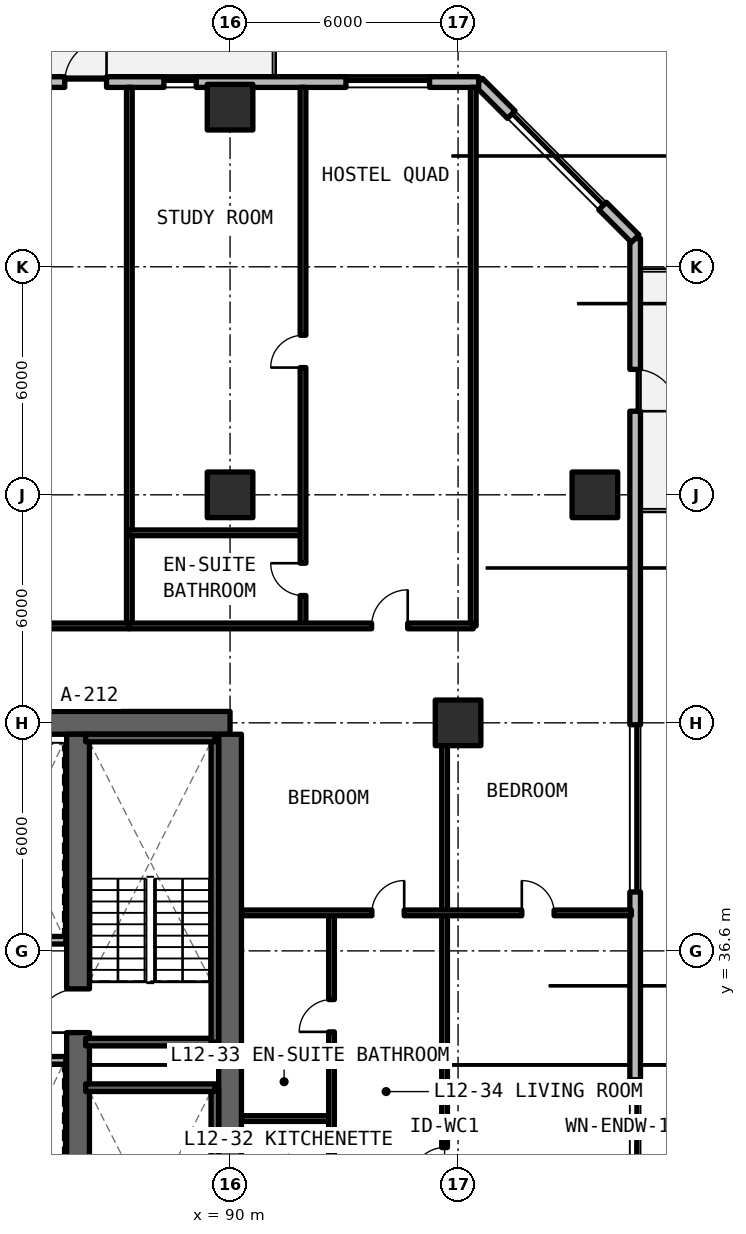
"""IFC4 building model, lengths in metres.
Left out: names, types, materials, properties, quantities, classifications, styles, units other than length and angle.
Written with IfcOpenShell. Run it as: python <this file> out.ifc"""

import sys

from ifc_helpers import new_model, si_unit, direction, frame, frame_2d, origin, origin_2d, place, context, subcontext, project, spatial, rectangle, extrude, element, fill, save


model = new_model("IFC4")
c1 = context("Model", 3, precision=1e-05, world=origin(), true_north=direction((0.0, 1.0)))
c2 = subcontext(c1, "Body", "Model", "MODEL_VIEW")
j1 = project(units=[si_unit("LENGTHUNIT", "METRE"), si_unit("PLANEANGLEUNIT", "RADIAN")], contexts=[c1])
p1 = place(None, origin())
s1 = spatial("IfcSite", under=j1, at=p1, CompositionType="ELEMENT")
p2 = place(p1, origin())
s2 = spatial("IfcBuilding", under=s1, at=p2, CompositionType="ELEMENT")
p3 = place(p2, frame((0.0, 0.0, 45.54)))
s3 = spatial("IfcBuildingStorey", under=s2, at=p3, CompositionType="ELEMENT", Elevation=45.54)
p4 = place(p3, frame((90.0, 42.6, 0.0), z_axis=(0.0, 0.0, 1.0), x_axis=(-1.0, 0.0, 0.0)))
e1 = element("IfcWall", 1, at=p4, inside=s3, PredefinedType="SHEAR", context=c2, shape_type="SweptSolid", body=[
    extrude(rectangle(XDim=12.0, YDim=0.6, at=frame_2d((6.0, 0.0))), origin(), (0.0, 0.0, 1.0), 3.3),
])
p5 = place(p3, frame((90.0, 24.9, 0.0), z_axis=(0.0, 0.0, 1.0), x_axis=(0.0, 1.0, 0.0)))
e2 = element("IfcWall", 2, at=p5, inside=s3, PredefinedType="SHEAR", context=c2, shape_type="SweptSolid", body=[
    extrude(rectangle(XDim=17.4, YDim=0.6, at=frame_2d((8.7, 0.0))), origin(), (0.0, 0.0, 1.0), 3.3),
])
p6 = place(p3, frame((86.0, 24.9, 0.0), z_axis=(0.0, 0.0, 1.0), x_axis=(0.0, 1.0, 0.0)))
e3 = element("IfcWall", 3, at=p6, inside=s3, PredefinedType="SHEAR", context=c2, shape_type="SweptSolid", body=[
    extrude(rectangle(XDim=17.4, YDim=0.6, at=frame_2d((8.7, 0.0))), origin(), (0.0, 0.0, 1.0), 3.3),
])
p7 = place(p6, frame((0.35, 0.0, 0.0)))
e4 = element("IfcOpeningElement", 4, at=p7, cuts=e3, PredefinedType="OPENING", context=c2, shape_type="SweptSolid", body=[
    extrude(rectangle(XDim=1.15, YDim=2.15, at=frame_2d((0.575, 1.075))), frame((0.0, 0.31, 0.0), z_axis=(0.0, -1.0, 0.0), x_axis=(1.0, 0.0, 0.0)), (0.0, 0.0, 1.0), 0.62),
])
p8 = place(p6, frame((9.55, 0.0, 0.0)))
e5 = element("IfcOpeningElement", 5, at=p8, cuts=e3, PredefinedType="OPENING", context=c2, shape_type="SweptSolid", body=[
    extrude(rectangle(XDim=1.15, YDim=2.15, at=frame_2d((0.575, 1.075))), frame((0.0, 0.31, 0.0), z_axis=(0.0, -1.0, 0.0), x_axis=(1.0, 0.0, 0.0)), (0.0, 0.0, 1.0), 0.62),
])
for number, where, z_axis, x_axis in (
    (6, (96.0, 42.6, 0.0), (0.0, 0.0, 1.0), (1.0, 0.0, 0.0)),
    (7, (90.0, 48.6, 0.0), (0.0, 0.0, 1.0), (1.0, 0.0, 0.0)),
    (8, (99.6, 48.6, 0.0), (0.0, 0.0, 1.0), (1.0, 0.0, 0.0)),
    (9, (90.0, 58.8, 0.0), (0.0, 0.0, 1.0), (1.0, 0.0, 0.0)),
):
    element("IfcColumn", number, at=place(p3, frame(where, z_axis=z_axis, x_axis=x_axis)), inside=s3, PredefinedType="COLUMN", context=c2, shape_type="SweptSolid", body=[
        extrude(rectangle(XDim=1.2, YDim=1.2, at=origin_2d()), origin(), (0.0, 0.0, 1.0), 3.3),
    ])
p9 = place(p3, frame((100.66, 11.858, 0.0), z_axis=(0.0, 0.0, 1.0), x_axis=(0.0, 1.0, 0.0)))
e10 = element("IfcWall", 10, at=p9, inside=s3, PredefinedType="SOLIDWALL", context=c2, shape_type="SweptSolid", body=[
    extrude(rectangle(XDim=43.484, YDim=0.28, at=frame_2d((21.742, 0.0))), origin(), (0.0, 0.0, 1.0), 3.08),
])
p10 = place(p9, frame((3.442, 0.0, 0.0)))
e11 = element("IfcOpeningElement", 11, at=p10, cuts=e10, PredefinedType="OPENING", context=c2, shape_type="SweptSolid", body=[
    extrude(rectangle(XDim=1.1, YDim=2.15, at=frame_2d((0.55, 1.075))), frame((0.0, 0.15, 0.0), z_axis=(0.0, -1.0, 0.0), x_axis=(1.0, 0.0, 0.0)), (0.0, 0.0, 1.0), 0.3),
])
p11 = place(p9, frame((38.942, 0.0, 0.0)))
e12 = element("IfcOpeningElement", 12, at=p11, cuts=e10, PredefinedType="OPENING", context=c2, shape_type="SweptSolid", body=[
    extrude(rectangle(XDim=1.1, YDim=2.15, at=frame_2d((0.55, 1.075))), frame((0.0, 0.15, 0.0), z_axis=(0.0, -1.0, 0.0), x_axis=(1.0, 0.0, 0.0)), (0.0, 0.0, 1.0), 0.3),
])
p12 = place(p9, frame((16.952, 0.0, 0.78)))
e13 = element("IfcOpeningElement", 13, at=p12, cuts=e10, PredefinedType="OPENING", context=c2, shape_type="SweptSolid", body=[
    extrude(rectangle(XDim=4.4, YDim=1.66, at=frame_2d((2.2, 0.83))), frame((0.0, 0.15, 0.0), z_axis=(0.0, -1.0, 0.0), x_axis=(1.0, 0.0, 0.0)), (0.0, 0.0, 1.0), 0.3),
])
p13 = place(p9, frame((26.292, 0.0, 0.78)))
e14 = element("IfcOpeningElement", 14, at=p13, cuts=e10, PredefinedType="OPENING", context=c2, shape_type="SweptSolid", body=[
    extrude(rectangle(XDim=4.4, YDim=1.66, at=frame_2d((2.2, 0.83))), frame((0.0, 0.15, 0.0), z_axis=(0.0, -1.0, 0.0), x_axis=(1.0, 0.0, 0.0)), (0.0, 0.0, 1.0), 0.3),
])
p14 = place(p3, frame((100.66, 55.342, 0.0), z_axis=(0.0, 0.0, 1.0), x_axis=(-0.707106781187, 0.707106781187, 0.0)))
e15 = element("IfcWall", 15, at=p14, inside=s3, PredefinedType="SOLIDWALL", context=c2, shape_type="SweptSolid", body=[
    extrude(rectangle(XDim=5.824, YDim=0.28, at=frame_2d((2.912, 0.0))), origin(), (0.0, 0.0, 1.0), 3.08),
])
p15 = place(p14, frame((1.212, 0.0, 0.78)))
e16 = element("IfcOpeningElement", 16, at=p15, cuts=e15, PredefinedType="OPENING", context=c2, shape_type="SweptSolid", body=[
    extrude(rectangle(XDim=3.4, YDim=1.66, at=frame_2d((1.7, 0.83))), frame((0.0, 0.15, 0.0), z_axis=(0.0, -1.0, 0.0), x_axis=(1.0, 0.0, 0.0)), (0.0, 0.0, 1.0), 0.3),
])
p16 = place(p3, frame((96.542, 59.46, 0.0), z_axis=(0.0, 0.0, 1.0), x_axis=(-1.0, 0.0, 0.0)))
e17 = element("IfcWall", 17, at=p16, inside=s3, PredefinedType="SOLIDWALL", context=c2, shape_type="SweptSolid", body=[
    extrude(rectangle(XDim=44.402, YDim=0.28, at=frame_2d((22.201, 0.0))), origin(), (0.0, 0.0, 1.0), 3.08),
])
p17 = place(p16, frame((32.592, 0.0, 0.0)))
e18 = element("IfcOpeningElement", 18, at=p17, cuts=e17, PredefinedType="OPENING", context=c2, shape_type="SweptSolid", body=[
    extrude(rectangle(XDim=1.1, YDim=2.15, at=frame_2d((0.55, 1.075))), frame((0.0, 0.15, 0.0), z_axis=(0.0, -1.0, 0.0), x_axis=(1.0, 0.0, 0.0)), (0.0, 0.0, 1.0), 0.3),
])
p18 = place(p16, frame((21.742, 0.0, 0.0)))
e19 = element("IfcOpeningElement", 19, at=p18, cuts=e17, PredefinedType="OPENING", context=c2, shape_type="SweptSolid", body=[
    extrude(rectangle(XDim=1.1, YDim=2.15, at=frame_2d((0.55, 1.075))), frame((0.0, 0.15, 0.0), z_axis=(0.0, -1.0, 0.0), x_axis=(1.0, 0.0, 0.0)), (0.0, 0.0, 1.0), 0.3),
])
p19 = place(p16, frame((9.792, 0.0, 0.0)))
e20 = element("IfcOpeningElement", 20, at=p19, cuts=e17, PredefinedType="OPENING", context=c2, shape_type="SweptSolid", body=[
    extrude(rectangle(XDim=1.1, YDim=2.15, at=frame_2d((0.55, 1.075))), frame((0.0, 0.15, 0.0), z_axis=(0.0, -1.0, 0.0), x_axis=(1.0, 0.0, 0.0)), (0.0, 0.0, 1.0), 0.3),
])
p20 = place(p16, frame((39.455, 0.0, 0.78)))
e21 = element("IfcOpeningElement", 21, at=p20, cuts=e17, PredefinedType="OPENING", context=c2, shape_type="SweptSolid", body=[
    extrude(rectangle(XDim=2.2, YDim=1.66, at=frame_2d((1.1, 0.83))), frame((0.0, 0.15, 0.0), z_axis=(0.0, -1.0, 0.0), x_axis=(1.0, 0.0, 0.0)), (0.0, 0.0, 1.0), 0.3),
])
p21 = place(p16, frame((7.432, 0.0, 0.78)))
e22 = element("IfcOpeningElement", 22, at=p21, cuts=e17, PredefinedType="OPENING", context=c2, shape_type="SweptSolid", body=[
    extrude(rectangle(XDim=0.85, YDim=1.65, at=frame_2d((0.425, 0.825))), frame((0.0, 0.15, 0.0), z_axis=(0.0, -1.0, 0.0), x_axis=(1.0, 0.0, 0.0)), (0.0, 0.0, 1.0), 0.3),
])
p22 = place(p16, frame((1.292, 0.0, 0.78)))
e23 = element("IfcOpeningElement", 23, at=p22, cuts=e17, PredefinedType="OPENING", context=c2, shape_type="SweptSolid", body=[
    extrude(rectangle(XDim=2.2, YDim=1.66, at=frame_2d((1.1, 0.83))), frame((0.0, 0.15, 0.0), z_axis=(0.0, -1.0, 0.0), x_axis=(1.0, 0.0, 0.0)), (0.0, 0.0, 1.0), 0.3),
])
for number, where, z_axis, x_axis in (
    (24, (83.2, 33.72, 0.0), (0.0, 0.0, 1.0), (1.0, 0.0, 0.0)),
    (25, (83.2, 36.88, 0.0), (0.0, 0.0, 1.0), (1.0, 0.0, 0.0)),
):
    element("IfcWall", number, at=place(p3, frame(where, z_axis=z_axis, x_axis=x_axis)), inside=s3, PredefinedType="SOLIDWALL", context=c2, shape_type="SweptSolid", body=[
        extrude(rectangle(XDim=2.48, YDim=0.2, at=frame_2d((1.24, 0.0))), origin(), (0.0, 0.0, 1.0), 2.35),
    ])
p23 = place(p3, frame((95.645, 24.4, 0.0), z_axis=(0.0, 0.0, 1.0), x_axis=(0.0, 1.0, 0.0)))
e26 = element("IfcWall", 26, at=p23, inside=s3, PredefinedType="PARTITIONING", context=c2, shape_type="SweptSolid", body=[
    extrude(rectangle(XDim=13.2, YDim=0.15, at=frame_2d((6.6, 0.0))), origin(), (0.0, 0.0, 1.0), 2.35),
])
p24 = place(p23, frame((6.175, 0.0, 0.0)))
e27 = element("IfcOpeningElement", 27, at=p24, cuts=e26, PredefinedType="OPENING", context=c2, shape_type="SweptSolid", body=[
    extrude(rectangle(XDim=0.85, YDim=2.1, at=frame_2d((0.425, 1.05))), frame((0.0, 0.085, 0.0), z_axis=(0.0, -1.0, 0.0), x_axis=(1.0, 0.0, 0.0)), (0.0, 0.0, 1.0), 0.17),
])
p25 = place(p3, frame((90.32, 32.188, 0.0), z_axis=(0.0, 0.0, 1.0), x_axis=(1.0, 0.0, 0.0)))
e28 = element("IfcWall", 28, at=p25, inside=s3, PredefinedType="PARTITIONING", context=c2, shape_type="SweptSolid", body=[
    extrude(rectangle(XDim=2.35, YDim=0.15, at=frame_2d((1.175, 0.0))), origin(), (0.0, 0.0, 1.0), 2.35),
])
p26 = place(p3, frame((92.67, 24.4, 0.0), z_axis=(0.0, 0.0, 1.0), x_axis=(0.0, 1.0, 0.0)))
e29 = element("IfcWall", 29, at=p26, inside=s3, PredefinedType="PARTITIONING", context=c2, shape_type="SweptSolid", body=[
    extrude(rectangle(XDim=13.2, YDim=0.15, at=frame_2d((6.6, 0.0))), origin(), (0.0, 0.0, 1.0), 2.35),
])
p27 = place(p26, frame((3.469, 0.0, 0.0)))
e30 = element("IfcOpeningElement", 30, at=p27, cuts=e29, PredefinedType="OPENING", context=c2, shape_type="SweptSolid", body=[
    extrude(rectangle(XDim=0.85, YDim=2.1, at=frame_2d((0.425, 1.05))), frame((0.0, 0.085, 0.0), z_axis=(0.0, -1.0, 0.0), x_axis=(1.0, 0.0, 0.0)), (0.0, 0.0, 1.0), 0.17),
])
p28 = place(p26, frame((10.069, 0.0, 0.0)))
e31 = element("IfcOpeningElement", 31, at=p28, cuts=e29, PredefinedType="OPENING", context=c2, shape_type="SweptSolid", body=[
    extrude(rectangle(XDim=0.85, YDim=2.1, at=frame_2d((0.425, 1.05))), frame((0.0, 0.085, 0.0), z_axis=(0.0, -1.0, 0.0), x_axis=(1.0, 0.0, 0.0)), (0.0, 0.0, 1.0), 0.17),
])
p29 = place(p3, frame((95.645, 37.6, 0.0), z_axis=(0.0, 0.0, 1.0), x_axis=(0.0, 1.0, 0.0)))
e32 = element("IfcWall", 32, at=p29, inside=s3, PredefinedType="PARTITIONING", context=c2, shape_type="SweptSolid", body=[
    extrude(rectangle(XDim=5.2, YDim=0.15, at=frame_2d((2.6, 0.0))), origin(), (0.0, 0.0, 1.0), 2.35),
])
p30 = place(p3, frame((90.32, 37.6, 0.0), z_axis=(0.0, 0.0, 1.0), x_axis=(1.0, 0.0, 0.0)))
e33 = element("IfcWall", 33, at=p30, inside=s3, PredefinedType="PARTITIONING", context=c2, shape_type="SweptSolid", body=[
    extrude(rectangle(XDim=10.24, YDim=0.15, at=frame_2d((5.12, 0.0))), origin(), (0.0, 0.0, 1.0), 2.35),
])
p31 = place(p30, frame((3.412, 0.0, 0.0)))
e34 = element("IfcOpeningElement", 34, at=p31, cuts=e33, PredefinedType="OPENING", context=c2, shape_type="SweptSolid", body=[
    extrude(rectangle(XDim=0.85, YDim=2.1, at=frame_2d((0.425, 1.05))), frame((0.0, 0.085, 0.0), z_axis=(0.0, -1.0, 0.0), x_axis=(1.0, 0.0, 0.0)), (0.0, 0.0, 1.0), 0.17),
])
p32 = place(p30, frame((7.357, 0.0, 0.0)))
e35 = element("IfcOpeningElement", 35, at=p32, cuts=e33, PredefinedType="OPENING", context=c2, shape_type="SweptSolid", body=[
    extrude(rectangle(XDim=0.85, YDim=2.1, at=frame_2d((0.425, 1.05))), frame((0.0, 0.085, 0.0), z_axis=(0.0, -1.0, 0.0), x_axis=(1.0, 0.0, 0.0)), (0.0, 0.0, 1.0), 0.17),
])
for number, where, z_axis, x_axis in (
    (36, (96.4, 45.15, 0.0), (0.0, 0.0, 1.0), (0.0, 1.0, 0.0)),
    (37, (87.35, 45.15, 0.0), (0.0, 0.0, 1.0), (0.0, 1.0, 0.0)),
):
    element("IfcWall", number, at=place(p3, frame(where, z_axis=z_axis, x_axis=x_axis)), inside=s3, PredefinedType="SOLIDWALL", context=c2, shape_type="SweptSolid", body=[
        extrude(rectangle(XDim=14.17, YDim=0.15, at=frame_2d((7.085, 0.0))), origin(), (0.0, 0.0, 1.0), 2.35),
    ])
p33 = place(p3, frame((75.391, 45.15, 0.0), z_axis=(0.0, 0.0, 1.0), x_axis=(1.0, 0.0, 0.0)))
e38 = element("IfcWall", 38, at=p33, inside=s3, PredefinedType="SOLIDWALL", context=c2, shape_type="SweptSolid", body=[
    extrude(rectangle(XDim=11.959, YDim=0.15, at=frame_2d((5.979, 0.0))), origin(), (0.0, 0.0, 1.0), 2.35),
])
p34 = place(p33, frame((5.429, 0.0, 0.0)))
e39 = element("IfcOpeningElement", 39, at=p34, cuts=e38, PredefinedType="OPENING", context=c2, shape_type="SweptSolid", body=[
    extrude(rectangle(XDim=1.1, YDim=2.15, at=frame_2d((0.55, 1.075))), frame((0.0, 0.085, 0.0), z_axis=(0.0, -1.0, 0.0), x_axis=(1.0, 0.0, 0.0)), (0.0, 0.0, 1.0), 0.17),
])
p35 = place(p3, frame((87.35, 47.6, 0.0), z_axis=(0.0, 0.0, 1.0), x_axis=(1.0, 0.0, 0.0)))
e40 = element("IfcWall", 40, at=p35, inside=s3, PredefinedType="PARTITIONING", context=c2, shape_type="SweptSolid", body=[
    extrude(rectangle(XDim=4.57, YDim=0.15, at=frame_2d((2.285, 0.0))), origin(), (0.0, 0.0, 1.0), 2.35),
])
p36 = place(p3, frame((91.92, 45.15, 0.0), z_axis=(0.0, 0.0, 1.0), x_axis=(0.0, 1.0, 0.0)))
e41 = element("IfcWall", 41, at=p36, inside=s3, PredefinedType="PARTITIONING", context=c2, shape_type="SweptSolid", body=[
    extrude(rectangle(XDim=14.17, YDim=0.15, at=frame_2d((7.085, 0.0))), origin(), (0.0, 0.0, 1.0), 2.35),
])
p37 = place(p36, frame((0.8, 0.0, 0.0)))
e42 = element("IfcOpeningElement", 42, at=p37, cuts=e41, PredefinedType="OPENING", context=c2, shape_type="SweptSolid", body=[
    extrude(rectangle(XDim=0.85, YDim=2.1, at=frame_2d((0.425, 1.05))), frame((0.0, 0.085, 0.0), z_axis=(0.0, -1.0, 0.0), x_axis=(1.0, 0.0, 0.0)), (0.0, 0.0, 1.0), 0.17),
])
p38 = place(p36, frame((6.798, 0.0, 0.0)))
e43 = element("IfcOpeningElement", 43, at=p38, cuts=e41, PredefinedType="OPENING", context=c2, shape_type="SweptSolid", body=[
    extrude(rectangle(XDim=0.85, YDim=2.1, at=frame_2d((0.425, 1.05))), frame((0.0, 0.085, 0.0), z_axis=(0.0, -1.0, 0.0), x_axis=(1.0, 0.0, 0.0)), (0.0, 0.0, 1.0), 0.17),
])
p39 = place(p3, frame((87.35, 45.15, 0.0), z_axis=(0.0, 0.0, 1.0), x_axis=(1.0, 0.0, 0.0)))
e44 = element("IfcWall", 44, at=p39, inside=s3, PredefinedType="SOLIDWALL", context=c2, shape_type="SweptSolid", body=[
    extrude(rectangle(XDim=9.05, YDim=0.15, at=frame_2d((4.525, 0.0))), origin(), (0.0, 0.0, 1.0), 2.35),
])
p40 = place(p39, frame((6.375, 0.0, 0.0)))
e45 = element("IfcOpeningElement", 45, at=p40, cuts=e44, PredefinedType="OPENING", context=c2, shape_type="SweptSolid", body=[
    extrude(rectangle(XDim=0.95, YDim=2.15, at=frame_2d((0.475, 1.075))), frame((0.0, 0.085, 0.0), z_axis=(0.0, -1.0, 0.0), x_axis=(1.0, 0.0, 0.0)), (0.0, 0.0, 1.0), 0.17),
])
p41 = place(p3, frame((89.6, 25.0, 0.0), z_axis=(0.0, 0.0, 1.0), x_axis=(0.0, 1.0, 0.0)))
e46 = element("IfcWall", 46, at=p41, inside=s3, PredefinedType="SOLIDWALL", context=c2, shape_type="SweptSolid", body=[
    extrude(rectangle(XDim=8.0, YDim=0.2, at=frame_2d((4.0, 0.0))), origin(), (0.0, 0.0, 1.0), 3.3),
])
for number, where, z_axis, x_axis in (
    (47, (89.6, 33.0, 0.0), (0.0, 0.0, 1.0), (-1.0, 0.0, 0.0)),
    (48, (86.2, 34.2, 0.0), (0.0, 0.0, 1.0), (1.0, 0.0, 0.0)),
):
    element("IfcWall", number, at=place(p3, frame(where, z_axis=z_axis, x_axis=x_axis)), inside=s3, PredefinedType="SOLIDWALL", context=c2, shape_type="SweptSolid", body=[
        extrude(rectangle(XDim=3.4, YDim=0.2, at=frame_2d((1.7, 0.0))), origin(), (0.0, 0.0, 1.0), 3.3),
    ])
p42 = place(p3, frame((89.6, 34.2, 0.0), z_axis=(0.0, 0.0, 1.0), x_axis=(0.0, 1.0, 0.0)))
e49 = element("IfcWall", 49, at=p42, inside=s3, PredefinedType="SOLIDWALL", context=c2, shape_type="SweptSolid", body=[
    extrude(rectangle(XDim=8.0, YDim=0.2, at=frame_2d((4.0, 0.0))), origin(), (0.0, 0.0, 1.0), 3.3),
])
p43 = place(p3, frame((89.6, 42.2, 0.0), z_axis=(0.0, 0.0, 1.0), x_axis=(-1.0, 0.0, 0.0)))
e50 = element("IfcWall", 50, at=p43, inside=s3, PredefinedType="SOLIDWALL", context=c2, shape_type="SweptSolid", body=[
    extrude(rectangle(XDim=3.4, YDim=0.2, at=frame_2d((1.7, 0.0))), origin(), (0.0, 0.0, 1.0), 3.3),
])
p44 = place(p11, frame((1.1, 0.0, 0.0), z_axis=(0.0, 0.0, 1.0), x_axis=(-1.0, 0.0, 0.0)))
e51 = element("IfcDoor", 51, at=p44, inside=s3, OperationType="SINGLE_SWING_LEFT", PredefinedType="DOOR", context=c2, shape_type="SweptSolid", body=[
    extrude(rectangle(XDim=1.1, YDim=2.15, at=frame_2d((0.55, 1.075))), frame((0.0, 0.025, 0.0), z_axis=(0.0, -1.0, 0.0), x_axis=(1.0, 0.0, 0.0)), (0.0, 0.0, 1.0), 0.05),
])
fill(e12, e51)
p45 = place(p12, origin())
e52 = element("IfcWindow", 52, at=p45, inside=s3, PartitioningType="SINGLE_PANEL", PredefinedType="WINDOW", context=c2, shape_type="SweptSolid", body=[
    extrude(rectangle(XDim=4.4, YDim=1.66, at=frame_2d((2.2, 0.83))), frame((0.0, 0.03, 0.0), z_axis=(0.0, -1.0, 0.0), x_axis=(1.0, 0.0, 0.0)), (0.0, 0.0, 1.0), 0.06),
])
fill(e13, e52)
p46 = place(p13, origin())
e53 = element("IfcWindow", 53, at=p46, inside=s3, PartitioningType="SINGLE_PANEL", PredefinedType="WINDOW", context=c2, shape_type="SweptSolid", body=[
    extrude(rectangle(XDim=4.4, YDim=1.66, at=frame_2d((2.2, 0.83))), frame((0.0, 0.03, 0.0), z_axis=(0.0, -1.0, 0.0), x_axis=(1.0, 0.0, 0.0)), (0.0, 0.0, 1.0), 0.06),
])
fill(e14, e53)
p47 = place(p15, origin())
e54 = element("IfcWindow", 54, at=p47, inside=s3, PartitioningType="SINGLE_PANEL", PredefinedType="WINDOW", context=c2, shape_type="SweptSolid", body=[
    extrude(rectangle(XDim=3.4, YDim=1.66, at=frame_2d((1.7, 0.83))), frame((0.0, 0.03, 0.0), z_axis=(0.0, -1.0, 0.0), x_axis=(1.0, 0.0, 0.0)), (0.0, 0.0, 1.0), 0.06),
])
fill(e16, e54)
p48 = place(p19, frame((1.1, 0.0, 0.0), z_axis=(0.0, 0.0, 1.0), x_axis=(-1.0, 0.0, 0.0)))
e55 = element("IfcDoor", 55, at=p48, inside=s3, OperationType="SINGLE_SWING_RIGHT", PredefinedType="DOOR", context=c2, shape_type="SweptSolid", body=[
    extrude(rectangle(XDim=1.1, YDim=2.15, at=frame_2d((0.55, 1.075))), frame((0.0, 0.025, 0.0), z_axis=(0.0, -1.0, 0.0), x_axis=(1.0, 0.0, 0.0)), (0.0, 0.0, 1.0), 0.05),
])
fill(e20, e55)
p49 = place(p21, origin())
e56 = element("IfcWindow", 56, at=p49, inside=s3, PartitioningType="SINGLE_PANEL", PredefinedType="WINDOW", context=c2, shape_type="SweptSolid", body=[
    extrude(rectangle(XDim=0.85, YDim=1.65, at=frame_2d((0.425, 0.825))), frame((0.0, 0.03, 0.0), z_axis=(0.0, -1.0, 0.0), x_axis=(1.0, 0.0, 0.0)), (0.0, 0.0, 1.0), 0.06),
])
fill(e22, e56)
p50 = place(p22, origin())
e57 = element("IfcWindow", 57, at=p50, inside=s3, PartitioningType="SINGLE_PANEL", PredefinedType="WINDOW", context=c2, shape_type="SweptSolid", body=[
    extrude(rectangle(XDim=2.2, YDim=1.66, at=frame_2d((1.1, 0.83))), frame((0.0, 0.03, 0.0), z_axis=(0.0, -1.0, 0.0), x_axis=(1.0, 0.0, 0.0)), (0.0, 0.0, 1.0), 0.06),
])
fill(e23, e57)
p51 = place(p24, origin())
e58 = element("IfcDoor", 58, at=p51, inside=s3, OperationType="SINGLE_SWING_LEFT", PredefinedType="DOOR", context=c2, shape_type="SweptSolid", body=[
    extrude(rectangle(XDim=0.85, YDim=2.1, at=frame_2d((0.425, 1.05))), frame((0.0, 0.025, 0.0), z_axis=(0.0, -1.0, 0.0), x_axis=(1.0, 0.0, 0.0)), (0.0, 0.0, 1.0), 0.05),
])
fill(e27, e58)
p52 = place(p28, origin())
e59 = element("IfcDoor", 59, at=p52, inside=s3, OperationType="SINGLE_SWING_LEFT", PredefinedType="DOOR", context=c2, shape_type="SweptSolid", body=[
    extrude(rectangle(XDim=0.85, YDim=2.1, at=frame_2d((0.425, 1.05))), frame((0.0, 0.025, 0.0), z_axis=(0.0, -1.0, 0.0), x_axis=(1.0, 0.0, 0.0)), (0.0, 0.0, 1.0), 0.05),
])
fill(e31, e59)
p53 = place(p31, origin())
e60 = element("IfcDoor", 60, at=p53, inside=s3, OperationType="SINGLE_SWING_RIGHT", PredefinedType="DOOR", context=c2, shape_type="SweptSolid", body=[
    extrude(rectangle(XDim=0.85, YDim=2.1, at=frame_2d((0.425, 1.05))), frame((0.0, 0.025, 0.0), z_axis=(0.0, -1.0, 0.0), x_axis=(1.0, 0.0, 0.0)), (0.0, 0.0, 1.0), 0.05),
])
fill(e34, e60)
p54 = place(p32, origin())
e61 = element("IfcDoor", 61, at=p54, inside=s3, OperationType="SINGLE_SWING_LEFT", PredefinedType="DOOR", context=c2, shape_type="SweptSolid", body=[
    extrude(rectangle(XDim=0.85, YDim=2.1, at=frame_2d((0.425, 1.05))), frame((0.0, 0.025, 0.0), z_axis=(0.0, -1.0, 0.0), x_axis=(1.0, 0.0, 0.0)), (0.0, 0.0, 1.0), 0.05),
])
fill(e35, e61)
p55 = place(p37, origin())
e62 = element("IfcDoor", 62, at=p55, inside=s3, OperationType="SINGLE_SWING_RIGHT", PredefinedType="DOOR", context=c2, shape_type="SweptSolid", body=[
    extrude(rectangle(XDim=0.85, YDim=2.1, at=frame_2d((0.425, 1.05))), frame((0.0, 0.025, 0.0), z_axis=(0.0, -1.0, 0.0), x_axis=(1.0, 0.0, 0.0)), (0.0, 0.0, 1.0), 0.05),
])
fill(e42, e62)
p56 = place(p38, origin())
e63 = element("IfcDoor", 63, at=p56, inside=s3, OperationType="SINGLE_SWING_LEFT", PredefinedType="DOOR", context=c2, shape_type="SweptSolid", body=[
    extrude(rectangle(XDim=0.85, YDim=2.1, at=frame_2d((0.425, 1.05))), frame((0.0, 0.025, 0.0), z_axis=(0.0, -1.0, 0.0), x_axis=(1.0, 0.0, 0.0)), (0.0, 0.0, 1.0), 0.05),
])
fill(e43, e63)
p57 = place(p40, origin())
e64 = element("IfcDoor", 64, at=p57, inside=s3, OperationType="SINGLE_SWING_RIGHT", PredefinedType="DOOR", context=c2, shape_type="SweptSolid", body=[
    extrude(rectangle(XDim=0.95, YDim=2.15, at=frame_2d((0.475, 1.075))), frame((0.0, 0.025, 0.0), z_axis=(0.0, -1.0, 0.0), x_axis=(1.0, 0.0, 0.0)), (0.0, 0.0, 1.0), 0.05),
])
fill(e45, e64)
p58 = place(p8, origin())
e65 = element("IfcDoor", 65, at=p58, inside=s3, OperationType="SINGLE_SWING_RIGHT", PredefinedType="DOOR", context=c2, shape_type="SweptSolid", body=[
    extrude(rectangle(XDim=1.15, YDim=2.15, at=frame_2d((0.575, 1.075))), frame((0.0, 0.025, 0.0), z_axis=(0.0, -1.0, 0.0), x_axis=(1.0, 0.0, 0.0)), (0.0, 0.0, 1.0), 0.05),
])
fill(e5, e65)
save(model, sys.argv[1])
